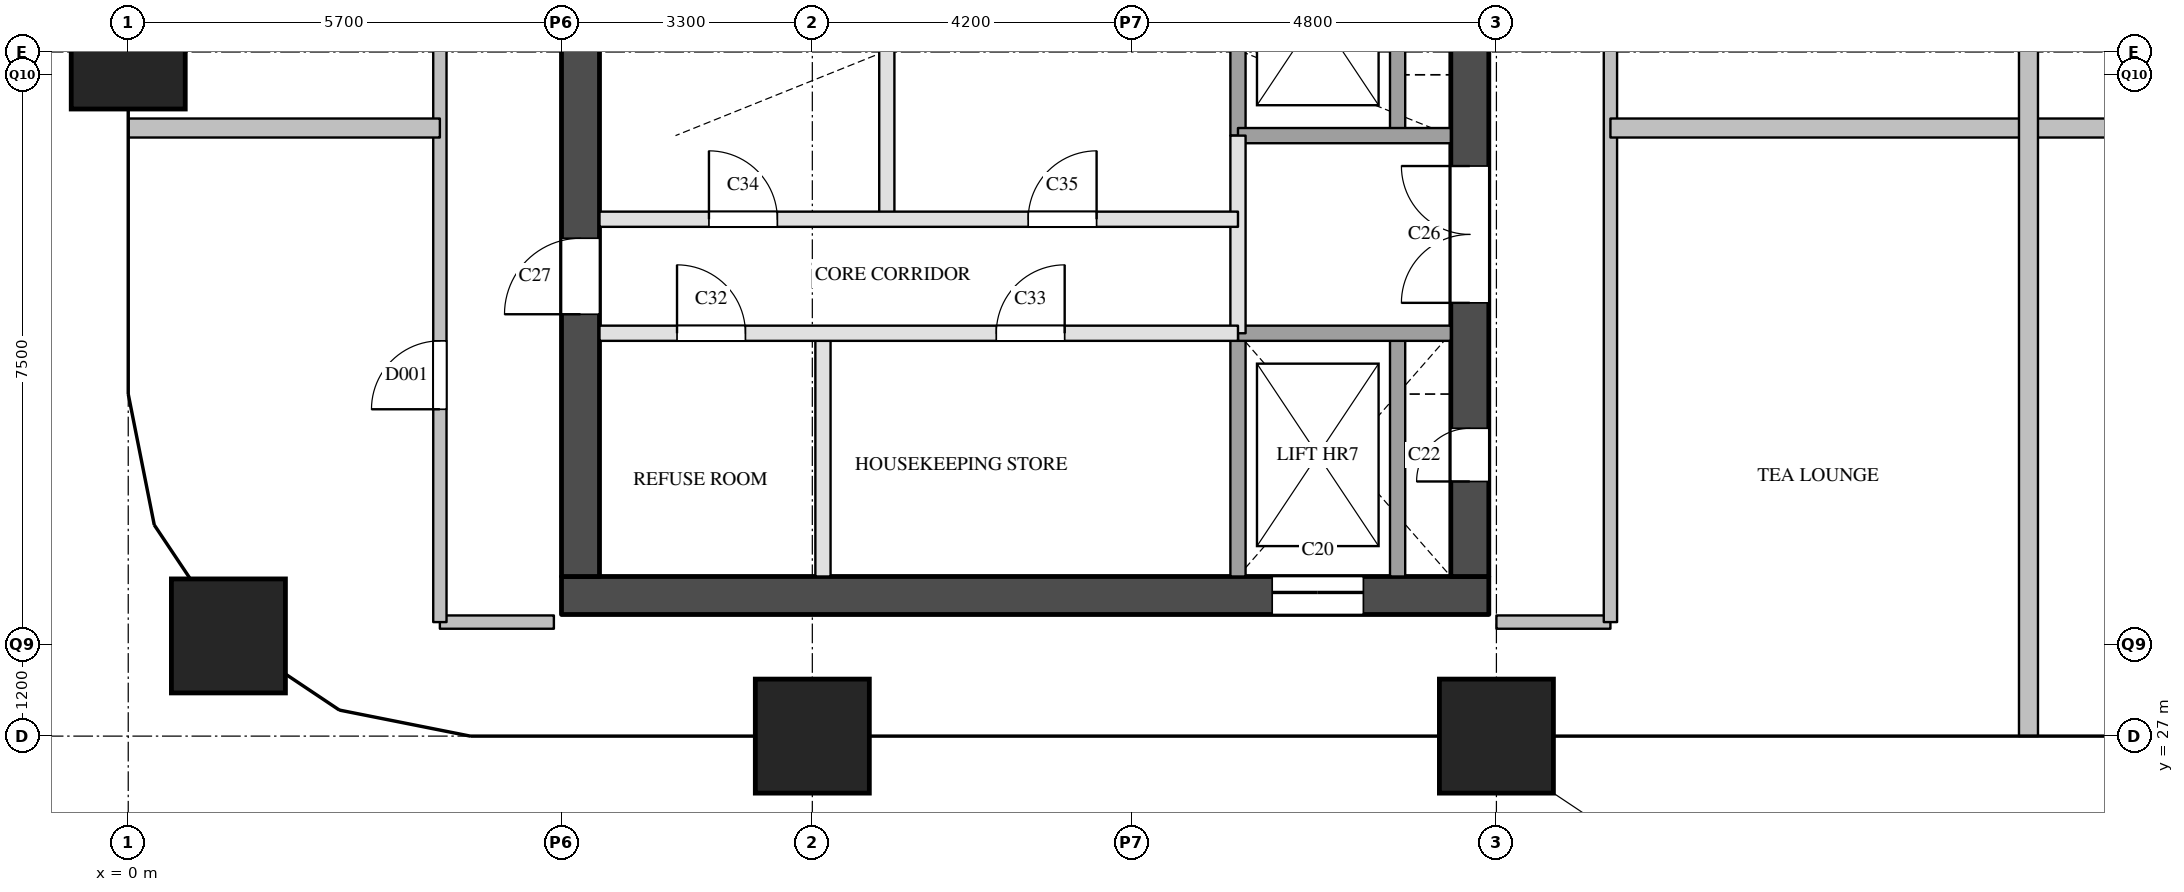
"""IFC4 building model, lengths in metres.
Left out: names, types, materials, properties, quantities, classifications, styles, units other than length and angle.
Written with IfcOpenShell. Run it as: python <this file> out.ifc"""

import sys

from ifc_helpers import new_model, si_unit, direction, frame, frame_2d, origin, origin_2d, place, context, subcontext, project, spatial, rectangle, extrude, element, fill, save


model = new_model("IFC4")
c1 = context("Model", 3, precision=1e-05, world=origin(), true_north=direction((0.0, 1.0)))
c2 = subcontext(c1, "Body", "Model", "MODEL_VIEW")
j1 = project(units=[si_unit("LENGTHUNIT", "METRE"), si_unit("PLANEANGLEUNIT", "RADIAN")], contexts=[c1])
p1 = place(None, origin())
s1 = spatial("IfcSite", under=j1, at=p1, CompositionType="ELEMENT")
p2 = place(p1, origin())
s2 = spatial("IfcBuilding", under=s1, at=p2, CompositionType="ELEMENT")
p3 = place(p2, frame((0.0, 0.0, 177.8)))
s3 = spatial("IfcBuildingStorey", under=s2, at=p3, CompositionType="ELEMENT", Elevation=177.8)
for number, where, z_axis, x_axis in (
    (1, (1.318, 28.318, 0.0), (0.0, 0.0, 1.0), (1.0, 0.0, 0.0)),
    (2, (0.0, 36.0, 0.0), (0.0, 0.0, 1.0), (1.0, 0.0, 0.0)),
    (3, (9.0, 27.0, 0.0), (0.0, 0.0, 1.0), (1.0, 0.0, 0.0)),
    (4, (18.0, 27.0, 0.0), (0.0, 0.0, 1.0), (1.0, 0.0, 0.0)),
):
    element("IfcColumn", number, at=place(p3, frame(where, z_axis=z_axis, x_axis=x_axis)), inside=s3, PredefinedType="COLUMN", context=c2, shape_type="SweptSolid", body=[
        extrude(rectangle(XDim=1.5, YDim=1.5, at=origin_2d()), origin(), (0.0, 0.0, 1.0), 3.9),
    ])
p4 = place(p3, frame((5.7, 28.85, 0.0), z_axis=(0.0, 0.0, 1.0), x_axis=(1.0, 0.0, 0.0)))
e5 = element("IfcWall", 5, at=p4, inside=s3, PredefinedType="SHEAR", context=c2, shape_type="SweptSolid", body=[
    extrude(rectangle(XDim=12.2, YDim=0.5, at=frame_2d((6.1, 0.0))), origin(), (0.0, 0.0, 1.0), 3.6),
])
p5 = place(p4, frame((9.35, 0.0, 0.0)))
e6 = element("IfcOpeningElement", 6, at=p5, cuts=e5, PredefinedType="OPENING", context=c2, shape_type="SweptSolid", body=[
    extrude(rectangle(XDim=1.2, YDim=2.1, at=frame_2d((0.6, 1.05))), frame((0.0, 0.26, 0.0), z_axis=(0.0, -1.0, 0.0), x_axis=(1.0, 0.0, 0.0)), (0.0, 0.0, 1.0), 0.52),
])
p6 = place(p3, frame((5.95, 29.1, 0.0), z_axis=(0.0, 0.0, 1.0), x_axis=(0.0, 1.0, 0.0)))
e7 = element("IfcWall", 7, at=p6, inside=s3, PredefinedType="SHEAR", context=c2, shape_type="SweptSolid", body=[
    extrude(rectangle(XDim=20.3, YDim=0.5, at=frame_2d((10.15, 0.0))), origin(), (0.0, 0.0, 1.0), 3.6),
])
p7 = place(p6, frame((3.45, 0.0, 0.0)))
e8 = element("IfcOpeningElement", 8, at=p7, cuts=e7, PredefinedType="OPENING", context=c2, shape_type="SweptSolid", body=[
    extrude(rectangle(XDim=1.0, YDim=2.1, at=frame_2d((0.5, 1.05))), frame((0.0, 0.26, 0.0), z_axis=(0.0, -1.0, 0.0), x_axis=(1.0, 0.0, 0.0)), (0.0, 0.0, 1.0), 0.52),
])
p8 = place(p6, frame((16.4, 0.0, 0.0)))
e9 = element("IfcOpeningElement", 9, at=p8, cuts=e7, PredefinedType="OPENING", context=c2, shape_type="SweptSolid", body=[
    extrude(rectangle(XDim=1.0, YDim=2.1, at=frame_2d((0.5, 1.05))), frame((0.0, 0.26, 0.0), z_axis=(0.0, -1.0, 0.0), x_axis=(1.0, 0.0, 0.0)), (0.0, 0.0, 1.0), 0.52),
])
p9 = place(p3, frame((17.65, 29.1, 0.0), z_axis=(0.0, 0.0, 1.0), x_axis=(0.0, 1.0, 0.0)))
e10 = element("IfcWall", 10, at=p9, inside=s3, PredefinedType="SHEAR", context=c2, shape_type="SweptSolid", body=[
    extrude(rectangle(XDim=20.3, YDim=0.5, at=frame_2d((10.15, 0.0))), origin(), (0.0, 0.0, 1.0), 3.6),
])
p10 = place(p9, frame((1.25, 0.0, 0.0)))
e11 = element("IfcOpeningElement", 11, at=p10, cuts=e10, PredefinedType="OPENING", context=c2, shape_type="SweptSolid", body=[
    extrude(rectangle(XDim=0.7, YDim=2.1, at=frame_2d((0.35, 1.05))), frame((0.0, 0.26, 0.0), z_axis=(0.0, -1.0, 0.0), x_axis=(1.0, 0.0, 0.0)), (0.0, 0.0, 1.0), 0.52),
])
p11 = place(p9, frame((7.05, 0.0, 0.0)))
e12 = element("IfcOpeningElement", 12, at=p11, cuts=e10, PredefinedType="OPENING", context=c2, shape_type="SweptSolid", body=[
    extrude(rectangle(XDim=0.7, YDim=2.1, at=frame_2d((0.35, 1.05))), frame((0.0, 0.26, 0.0), z_axis=(0.0, -1.0, 0.0), x_axis=(1.0, 0.0, 0.0)), (0.0, 0.0, 1.0), 0.52),
])
p12 = place(p9, frame((3.6, 0.0, 0.0)))
e13 = element("IfcOpeningElement", 13, at=p12, cuts=e10, PredefinedType="OPENING", context=c2, shape_type="SweptSolid", body=[
    extrude(rectangle(XDim=1.8, YDim=2.1, at=frame_2d((0.9, 1.05))), frame((0.0, 0.26, 0.0), z_axis=(0.0, -1.0, 0.0), x_axis=(1.0, 0.0, 0.0)), (0.0, 0.0, 1.0), 0.52),
])
p13 = place(p3, frame((9.14, 29.1, 0.0), z_axis=(0.0, 0.0, 1.0), x_axis=(0.0, 1.0, 0.0)))
e14 = element("IfcWall", 14, at=p13, inside=s3, PredefinedType="PARTITIONING", context=c2, shape_type="SweptSolid", body=[
    extrude(rectangle(XDim=3.2, YDim=0.2, at=frame_2d((1.6, 0.0))), origin(), (0.0, 0.0, 1.0), 3.6),
])
p14 = place(p3, frame((9.98, 33.8, 0.0), z_axis=(0.0, 0.0, 1.0), x_axis=(0.0, 1.0, 0.0)))
e15 = element("IfcWall", 15, at=p14, inside=s3, PredefinedType="PARTITIONING", context=c2, shape_type="SweptSolid", body=[
    extrude(rectangle(XDim=4.3, YDim=0.2, at=frame_2d((2.15, 0.0))), origin(), (0.0, 0.0, 1.0), 3.6),
])
p15 = place(p3, frame((14.6, 32.3, 0.0), z_axis=(0.0, 0.0, 1.0), x_axis=(0.0, 1.0, 0.0)))
e16 = element("IfcWall", 16, at=p15, inside=s3, PredefinedType="PARTITIONING", context=c2, shape_type="SweptSolid", body=[
    extrude(rectangle(XDim=2.6, YDim=0.2, at=frame_2d((1.3, 0.0))), origin(), (0.0, 0.0, 1.0), 3.6),
])
p16 = place(p3, frame((14.6, 29.1, 0.0), z_axis=(0.0, 0.0, 1.0), x_axis=(0.0, 1.0, 0.0)))
e17 = element("IfcWall", 17, at=p16, inside=s3, PredefinedType="SOLIDWALL", context=c2, shape_type="SweptSolid", body=[
    extrude(rectangle(XDim=3.2, YDim=0.2, at=frame_2d((1.6, 0.0))), origin(), (0.0, 0.0, 1.0), 3.6),
])
p17 = place(p3, frame((14.6, 34.9, 0.0), z_axis=(0.0, 0.0, 1.0), x_axis=(0.0, 1.0, 0.0)))
e18 = element("IfcWall", 18, at=p17, inside=s3, PredefinedType="SOLIDWALL", context=c2, shape_type="SweptSolid", body=[
    extrude(rectangle(XDim=3.2, YDim=0.2, at=frame_2d((1.6, 0.0))), origin(), (0.0, 0.0, 1.0), 3.6),
])
p18 = place(p3, frame((16.7, 29.1, 0.0), z_axis=(0.0, 0.0, 1.0), x_axis=(0.0, 1.0, 0.0)))
e19 = element("IfcWall", 19, at=p18, inside=s3, PredefinedType="SOLIDWALL", context=c2, shape_type="SweptSolid", body=[
    extrude(rectangle(XDim=3.2, YDim=0.2, at=frame_2d((1.6, 0.0))), origin(), (0.0, 0.0, 1.0), 3.6),
])
p19 = place(p3, frame((16.7, 34.9, 0.0), z_axis=(0.0, 0.0, 1.0), x_axis=(0.0, 1.0, 0.0)))
e20 = element("IfcWall", 20, at=p19, inside=s3, PredefinedType="SOLIDWALL", context=c2, shape_type="SweptSolid", body=[
    extrude(rectangle(XDim=3.2, YDim=0.2, at=frame_2d((1.6, 0.0))), origin(), (0.0, 0.0, 1.0), 3.6),
])
p20 = place(p3, frame((6.2, 32.3, 0.0), z_axis=(0.0, 0.0, 1.0), x_axis=(1.0, 0.0, 0.0)))
e21 = element("IfcWall", 21, at=p20, inside=s3, PredefinedType="PARTITIONING", context=c2, shape_type="SweptSolid", body=[
    extrude(rectangle(XDim=8.4, YDim=0.2, at=frame_2d((4.2, 0.0))), origin(), (0.0, 0.0, 1.0), 3.6),
])
p21 = place(p20, frame((1.02, 0.0, 0.0)))
e22 = element("IfcOpeningElement", 22, at=p21, cuts=e21, PredefinedType="OPENING", context=c2, shape_type="SweptSolid", body=[
    extrude(rectangle(XDim=0.9, YDim=2.1, at=frame_2d((0.45, 1.05))), frame((0.0, 0.11, 0.0), z_axis=(0.0, -1.0, 0.0), x_axis=(1.0, 0.0, 0.0)), (0.0, 0.0, 1.0), 0.22),
])
p22 = place(p20, frame((5.22, 0.0, 0.0)))
e23 = element("IfcOpeningElement", 23, at=p22, cuts=e21, PredefinedType="OPENING", context=c2, shape_type="SweptSolid", body=[
    extrude(rectangle(XDim=0.9, YDim=2.1, at=frame_2d((0.45, 1.05))), frame((0.0, 0.11, 0.0), z_axis=(0.0, -1.0, 0.0), x_axis=(1.0, 0.0, 0.0)), (0.0, 0.0, 1.0), 0.22),
])
p23 = place(p3, frame((14.6, 32.3, 0.0), z_axis=(0.0, 0.0, 1.0), x_axis=(1.0, 0.0, 0.0)))
e24 = element("IfcWall", 24, at=p23, inside=s3, PredefinedType="SOLIDWALL", context=c2, shape_type="SweptSolid", body=[
    extrude(rectangle(XDim=2.8, YDim=0.2, at=frame_2d((1.4, 0.0))), origin(), (0.0, 0.0, 1.0), 3.6),
])
p24 = place(p3, frame((6.2, 33.8, 0.0), z_axis=(0.0, 0.0, 1.0), x_axis=(1.0, 0.0, 0.0)))
e25 = element("IfcWall", 25, at=p24, inside=s3, PredefinedType="PARTITIONING", context=c2, shape_type="SweptSolid", body=[
    extrude(rectangle(XDim=8.4, YDim=0.2, at=frame_2d((4.2, 0.0))), origin(), (0.0, 0.0, 1.0), 3.6),
])
p25 = place(p24, frame((1.44, 0.0, 0.0)))
e26 = element("IfcOpeningElement", 26, at=p25, cuts=e25, PredefinedType="OPENING", context=c2, shape_type="SweptSolid", body=[
    extrude(rectangle(XDim=0.9, YDim=2.1, at=frame_2d((0.45, 1.05))), frame((0.0, 0.11, 0.0), z_axis=(0.0, -1.0, 0.0), x_axis=(1.0, 0.0, 0.0)), (0.0, 0.0, 1.0), 0.22),
])
p26 = place(p24, frame((5.64, 0.0, 0.0)))
e27 = element("IfcOpeningElement", 27, at=p26, cuts=e25, PredefinedType="OPENING", context=c2, shape_type="SweptSolid", body=[
    extrude(rectangle(XDim=0.9, YDim=2.1, at=frame_2d((0.45, 1.05))), frame((0.0, 0.11, 0.0), z_axis=(0.0, -1.0, 0.0), x_axis=(1.0, 0.0, 0.0)), (0.0, 0.0, 1.0), 0.22),
])
p27 = place(p3, frame((14.6, 34.9, 0.0), z_axis=(0.0, 0.0, 1.0), x_axis=(1.0, 0.0, 0.0)))
e28 = element("IfcWall", 28, at=p27, inside=s3, PredefinedType="SOLIDWALL", context=c2, shape_type="SweptSolid", body=[
    extrude(rectangle(XDim=2.8, YDim=0.2, at=frame_2d((1.4, 0.0))), origin(), (0.0, 0.0, 1.0), 3.6),
])
for number, where, z_axis, x_axis in (
    (29, (4.1, 28.5, 0.0), (0.0, 0.0, 1.0), (1.0, 0.0, 0.0)),
    (30, (18.0, 28.5, 0.0), (0.0, 0.0, 1.0), (1.0, 0.0, 0.0)),
):
    element("IfcWall", number, at=place(p3, frame(where, z_axis=z_axis, x_axis=x_axis)), inside=s3, PredefinedType="PARTITIONING", context=c2, shape_type="SweptSolid", body=[
        extrude(rectangle(XDim=1.5, YDim=0.175, at=frame_2d((0.75, 0.0))), origin(), (0.0, 0.0, 1.0), 3.6),
    ])
p28 = place(p3, frame((4.1, 28.5, 0.0), z_axis=(0.0, 0.0, 1.0), x_axis=(0.0, 1.0, 0.0)))
e31 = element("IfcWall", 31, at=p28, inside=s3, PredefinedType="PARTITIONING", context=c2, shape_type="SweptSolid", body=[
    extrude(rectangle(XDim=23.0, YDim=0.175, at=frame_2d((11.5, 0.0))), origin(), (0.0, 0.0, 1.0), 3.6),
])
p29 = place(p28, frame((2.8, 0.0, 0.0)))
e32 = element("IfcOpeningElement", 32, at=p29, cuts=e31, PredefinedType="OPENING", context=c2, shape_type="SweptSolid", body=[
    extrude(rectangle(XDim=0.9, YDim=2.1, at=frame_2d((0.45, 1.05))), frame((0.0, 0.097, 0.0), z_axis=(0.0, -1.0, 0.0), x_axis=(1.0, 0.0, 0.0)), (0.0, 0.0, 1.0), 0.195),
])
p30 = place(p28, frame((11.72, 0.0, 0.0)))
e33 = element("IfcOpeningElement", 33, at=p30, cuts=e31, PredefinedType="OPENING", context=c2, shape_type="SweptSolid", body=[
    extrude(rectangle(XDim=0.9, YDim=2.1, at=frame_2d((0.45, 1.05))), frame((0.0, 0.097, 0.0), z_axis=(0.0, -1.0, 0.0), x_axis=(1.0, 0.0, 0.0)), (0.0, 0.0, 1.0), 0.195),
])
p31 = place(p28, frame((19.97, 0.0, 0.0)))
e34 = element("IfcOpeningElement", 34, at=p31, cuts=e31, PredefinedType="OPENING", context=c2, shape_type="SweptSolid", body=[
    extrude(rectangle(XDim=0.9, YDim=2.1, at=frame_2d((0.45, 1.05))), frame((0.0, 0.097, 0.0), z_axis=(0.0, -1.0, 0.0), x_axis=(1.0, 0.0, 0.0)), (0.0, 0.0, 1.0), 0.195),
])
p32 = place(p3, frame((19.5, 28.5, 0.0), z_axis=(0.0, 0.0, 1.0), x_axis=(0.0, 1.0, 0.0)))
e35 = element("IfcWall", 35, at=p32, inside=s3, PredefinedType="PARTITIONING", context=c2, shape_type="SweptSolid", body=[
    extrude(rectangle(XDim=23.0, YDim=0.175, at=frame_2d((11.5, 0.0))), origin(), (0.0, 0.0, 1.0), 3.6),
])
p33 = place(p32, frame((14.3, 0.0, 0.0)))
e36 = element("IfcOpeningElement", 36, at=p33, cuts=e35, PredefinedType="OPENING", context=c2, shape_type="SweptSolid", body=[
    extrude(rectangle(XDim=0.9, YDim=2.1, at=frame_2d((0.45, 1.05))), frame((0.0, 0.097, 0.0), z_axis=(0.0, -1.0, 0.0), x_axis=(1.0, 0.0, 0.0)), (0.0, 0.0, 1.0), 0.195),
])
p34 = place(p3, frame((0.0, 35.0, 0.0), z_axis=(0.0, 0.0, 1.0), x_axis=(1.0, 0.0, 0.0)))
e37 = element("IfcWall", 37, at=p34, inside=s3, PredefinedType="PARTITIONING", context=c2, shape_type="SweptSolid", body=[
    extrude(rectangle(XDim=4.1, YDim=0.25, at=frame_2d((2.05, 0.0))), origin(), (0.0, 0.0, 1.0), 2.6),
])
p35 = place(p3, frame((19.5, 35.0, 0.0), z_axis=(0.0, 0.0, 1.0), x_axis=(1.0, 0.0, 0.0)))
e38 = element("IfcWall", 38, at=p35, inside=s3, PredefinedType="PARTITIONING", context=c2, shape_type="SweptSolid", body=[
    extrude(rectangle(XDim=15.0, YDim=0.25, at=frame_2d((7.5, 0.0))), origin(), (0.0, 0.0, 1.0), 2.6),
])
p36 = place(p3, frame((25.0, 27.0, 0.0), z_axis=(0.0, 0.0, 1.0), x_axis=(0.0, 1.0, 0.0)))
e39 = element("IfcWall", 39, at=p36, inside=s3, PredefinedType="PARTITIONING", context=c2, shape_type="SweptSolid", body=[
    extrude(rectangle(XDim=27.0, YDim=0.25, at=frame_2d((13.5, 0.0))), origin(), (0.0, 0.0, 1.0), 2.6),
])
p37 = place(p5, origin())
e40 = element("IfcDoor", 40, at=p37, inside=s3, OperationType="SLIDING_TO_LEFT", PredefinedType="DOOR", context=c2, shape_type="SweptSolid", body=[
    extrude(rectangle(XDim=1.2, YDim=2.1, at=frame_2d((0.6, 1.05))), frame((0.0, 0.025, 0.0), z_axis=(0.0, -1.0, 0.0), x_axis=(1.0, 0.0, 0.0)), (0.0, 0.0, 1.0), 0.05),
])
fill(e6, e40)
p38 = place(p10, origin())
e41 = element("IfcDoor", 41, at=p38, inside=s3, OperationType="SINGLE_SWING_LEFT", PredefinedType="DOOR", context=c2, shape_type="SweptSolid", body=[
    extrude(rectangle(XDim=0.7, YDim=2.1, at=frame_2d((0.35, 1.05))), frame((0.0, 0.025, 0.0), z_axis=(0.0, -1.0, 0.0), x_axis=(1.0, 0.0, 0.0)), (0.0, 0.0, 1.0), 0.05),
])
fill(e11, e41)
p39 = place(p12, origin())
e42 = element("IfcDoor", 42, at=p39, inside=s3, OperationType="DOUBLE_DOOR_SINGLE_SWING", PredefinedType="DOOR", context=c2, shape_type="SweptSolid", body=[
    extrude(rectangle(XDim=1.8, YDim=2.1, at=frame_2d((0.9, 1.05))), frame((0.0, 0.025, 0.0), z_axis=(0.0, -1.0, 0.0), x_axis=(1.0, 0.0, 0.0)), (0.0, 0.0, 1.0), 0.05),
])
fill(e13, e42)
p40 = place(p7, origin())
e43 = element("IfcDoor", 43, at=p40, inside=s3, OperationType="SINGLE_SWING_LEFT", PredefinedType="DOOR", context=c2, shape_type="SweptSolid", body=[
    extrude(rectangle(XDim=1.0, YDim=2.1, at=frame_2d((0.5, 1.05))), frame((0.0, 0.025, 0.0), z_axis=(0.0, -1.0, 0.0), x_axis=(1.0, 0.0, 0.0)), (0.0, 0.0, 1.0), 0.05),
])
fill(e8, e43)
p41 = place(p21, origin())
e44 = element("IfcDoor", 44, at=p41, inside=s3, OperationType="SINGLE_SWING_LEFT", PredefinedType="DOOR", context=c2, shape_type="SweptSolid", body=[
    extrude(rectangle(XDim=0.9, YDim=2.1, at=frame_2d((0.45, 1.05))), frame((0.0, 0.025, 0.0), z_axis=(0.0, -1.0, 0.0), x_axis=(1.0, 0.0, 0.0)), (0.0, 0.0, 1.0), 0.05),
])
fill(e22, e44)
p42 = place(p22, origin())
e45 = element("IfcDoor", 45, at=p42, inside=s3, OperationType="SINGLE_SWING_RIGHT", PredefinedType="DOOR", context=c2, shape_type="SweptSolid", body=[
    extrude(rectangle(XDim=0.9, YDim=2.1, at=frame_2d((0.45, 1.05))), frame((0.0, 0.025, 0.0), z_axis=(0.0, -1.0, 0.0), x_axis=(1.0, 0.0, 0.0)), (0.0, 0.0, 1.0), 0.05),
])
fill(e23, e45)
p43 = place(p25, origin())
e46 = element("IfcDoor", 46, at=p43, inside=s3, OperationType="SINGLE_SWING_LEFT", PredefinedType="DOOR", context=c2, shape_type="SweptSolid", body=[
    extrude(rectangle(XDim=0.9, YDim=2.1, at=frame_2d((0.45, 1.05))), frame((0.0, 0.025, 0.0), z_axis=(0.0, -1.0, 0.0), x_axis=(1.0, 0.0, 0.0)), (0.0, 0.0, 1.0), 0.05),
])
fill(e26, e46)
p44 = place(p26, origin())
e47 = element("IfcDoor", 47, at=p44, inside=s3, OperationType="SINGLE_SWING_RIGHT", PredefinedType="DOOR", context=c2, shape_type="SweptSolid", body=[
    extrude(rectangle(XDim=0.9, YDim=2.1, at=frame_2d((0.45, 1.05))), frame((0.0, 0.025, 0.0), z_axis=(0.0, -1.0, 0.0), x_axis=(1.0, 0.0, 0.0)), (0.0, 0.0, 1.0), 0.05),
])
fill(e27, e47)
p45 = place(p29, origin())
e48 = element("IfcDoor", 48, at=p45, inside=s3, OperationType="SINGLE_SWING_LEFT", PredefinedType="DOOR", context=c2, shape_type="SweptSolid", body=[
    extrude(rectangle(XDim=0.9, YDim=2.1, at=frame_2d((0.45, 1.05))), frame((0.0, 0.025, 0.0), z_axis=(0.0, -1.0, 0.0), x_axis=(1.0, 0.0, 0.0)), (0.0, 0.0, 1.0), 0.05),
])
fill(e32, e48)
save(model, sys.argv[1])
